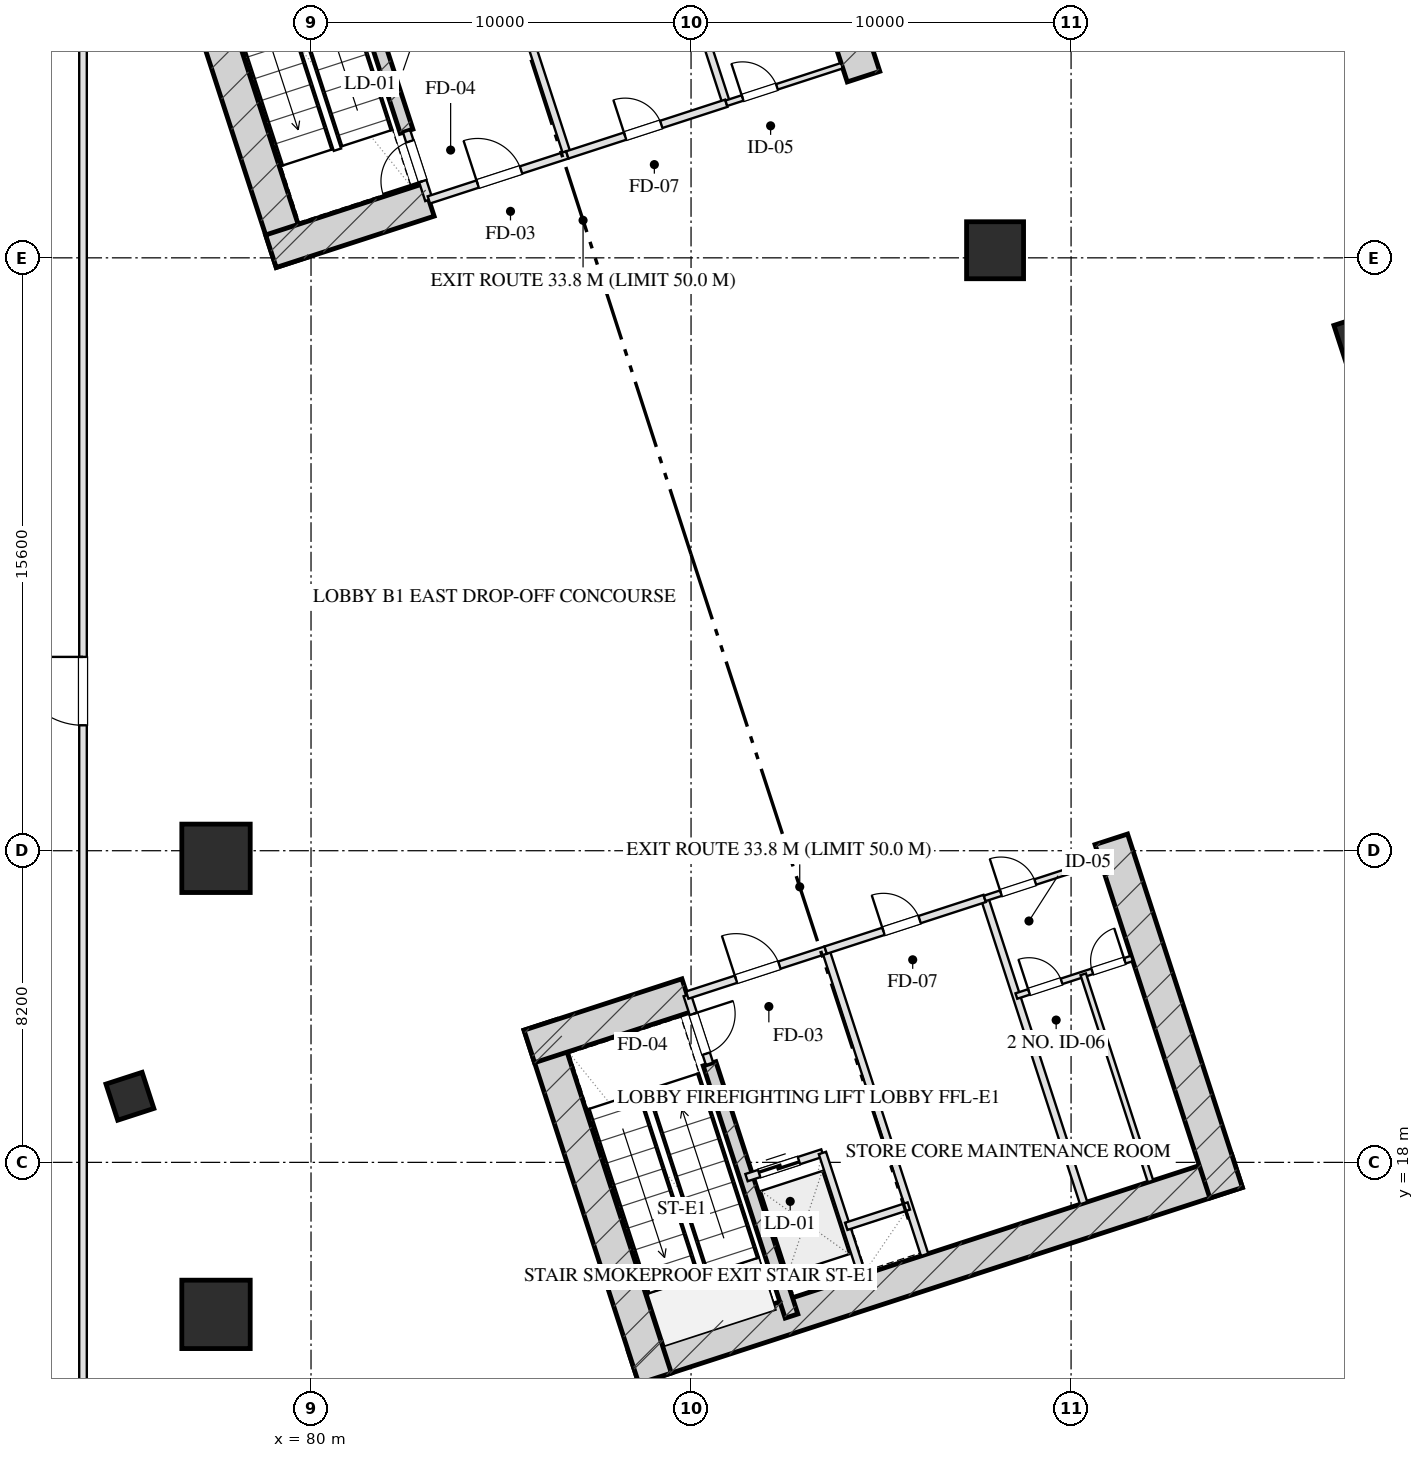
"""IFC4 building model, lengths in metres.
Left out: names, types, materials, properties, quantities, classifications, styles, units other than length and angle.
Written with IfcOpenShell. Run it as: python <this file> out.ifc"""

import sys

from ifc_helpers import new_model, si_unit, direction, frame, frame_2d, origin, origin_2d, place, context, subcontext, project, spatial, rectangle, hollow_rectangle, extrude, element, fill, save


model = new_model("IFC4")
c1 = context("Model", 3, precision=1e-05, world=origin(), true_north=direction((0.0, 1.0)))
c2 = subcontext(c1, "Body", "Model", "MODEL_VIEW")
j1 = project(units=[si_unit("LENGTHUNIT", "METRE"), si_unit("PLANEANGLEUNIT", "RADIAN")], contexts=[c1])
p1 = place(None, origin())
s1 = spatial("IfcSite", under=j1, at=p1, CompositionType="ELEMENT")
p2 = place(p1, origin())
s2 = spatial("IfcBuilding", under=s1, at=p2, CompositionType="ELEMENT")
p3 = place(p2, frame((0.0, 0.0, -6.0)))
s3 = spatial("IfcBuildingStorey", under=s2, at=p3, CompositionType="ELEMENT", Elevation=-6.0)
p4 = place(p3, frame((88.487, 12.605, 0.0), z_axis=(0.0, 0.0, 1.0), x_axis=(0.951055016115, 0.309021611416, 0.0)))
e1 = element("IfcWall", 1, at=p4, inside=s3, PredefinedType="SHEAR", context=c2, shape_type="SweptSolid", body=[
    extrude(rectangle(XDim=16.7, YDim=0.9, at=frame_2d((8.35, 0.0))), origin(), (0.0, 0.0, 1.0), 6.0),
])
p5 = place(p3, frame((86.032, 21.618, 0.0), z_axis=(0.0, 0.0, 1.0), x_axis=(0.30901438634, -0.951057363693, 0.0)))
e2 = element("IfcWall", 2, at=p5, inside=s3, PredefinedType="SHEAR", context=c2, shape_type="SweptSolid", body=[
    extrude(rectangle(XDim=9.78, YDim=0.9, at=frame_2d((4.89, 0.0))), origin(), (0.0, 0.0, 1.0), 6.0),
])
p6 = place(p3, frame((101.059, 26.5, 0.0), z_axis=(0.0, 0.0, 1.0), x_axis=(0.309021722829, -0.951054979914, 0.0)))
e3 = element("IfcWall", 3, at=p6, inside=s3, PredefinedType="SHEAR", context=c2, shape_type="SweptSolid", body=[
    extrude(rectangle(XDim=9.78, YDim=0.9, at=frame_2d((4.89, 0.0))), origin(), (0.0, 0.0, 1.0), 6.0),
])
p7 = place(p3, frame((90.486, 20.594, 0.0), z_axis=(0.0, 0.0, 1.0), x_axis=(0.309020428229, -0.951055400562, 0.0)))
e4 = element("IfcWall", 4, at=p7, inside=s3, PredefinedType="SHEAR", context=c2, shape_type="SweptSolid", body=[
    extrude(rectangle(XDim=6.98, YDim=0.35, at=frame_2d((3.49, 0.0))), origin(), (0.0, 0.0, 1.0), 6.0),
])
p8 = place(p3, frame((85.743, 21.051, 0.0), z_axis=(0.0, 0.0, 1.0), x_axis=(0.951063623806, 0.308995118848, 0.0)))
e5 = element("IfcWall", 5, at=p8, inside=s3, PredefinedType="SHEAR", context=c2, shape_type="SweptSolid", body=[
    extrude(rectangle(XDim=4.37, YDim=0.9, at=frame_2d((2.185, 0.0))), origin(), (0.0, 0.0, 1.0), 6.0),
])
for number, where, z_axis, x_axis in (
    (6, (79.512, 41.685, 0.0), (0.0, 0.0, 1.0), (-0.309, 0.951, 0.0)),
    (7, (94.539, 46.568, 0.0), (0.0, 0.0, 1.0), (-0.309, 0.951, 0.0)),
):
    element("IfcWall", number, at=place(p3, frame(where, z_axis=z_axis, x_axis=x_axis)), inside=s3, PredefinedType="SHEAR", context=c2, shape_type="SweptSolid", body=[
        extrude(rectangle(XDim=9.78, YDim=0.9, at=frame_2d((4.89, 0.0))), origin(), (0.0, 0.0, 1.0), 6.0),
    ])
p9 = place(p3, frame((82.514, 45.131, 0.0), z_axis=(0.0, 0.0, 1.0), x_axis=(-0.308988790936, 0.951065679686, 0.0)))
e8 = element("IfcWall", 8, at=p9, inside=s3, PredefinedType="SHEAR", context=c2, shape_type="SweptSolid", body=[
    extrude(rectangle(XDim=6.98, YDim=0.35, at=frame_2d((3.49, 0.0))), origin(), (0.0, 0.0, 1.0), 6.0),
])
p10 = place(p3, frame((78.945, 41.974, 0.0), z_axis=(0.0, 0.0, 1.0), x_axis=(0.951058289404, 0.309011537255, 0.0)))
e9 = element("IfcWall", 9, at=p10, inside=s3, PredefinedType="SHEAR", context=c2, shape_type="SweptSolid", body=[
    extrude(rectangle(XDim=4.37, YDim=0.9, at=frame_2d((2.185, 0.0))), origin(), (0.0, 0.0, 1.0), 6.0),
])
for number, where, z_axis, x_axis in (
    (10, (77.5, 14.0, 0.0), (0.0, 0.0, 1.0), (1.0, 0.0, 0.0)),
    (11, (77.5, 26.0, 0.0), (0.0, 0.0, 1.0), (1.0, 0.0, 0.0)),
):
    element("IfcColumn", number, at=place(p3, frame(where, z_axis=z_axis, x_axis=x_axis)), inside=s3, PredefinedType="COLUMN", context=c2, shape_type="SweptSolid", body=[
        extrude(hollow_rectangle(XDim=1.8, YDim=1.8, WallThickness=0.06, at=origin_2d()), origin(), (0.0, 0.0, 1.0), 6.001),
    ])
p11 = place(p3, frame((98.0, 42.0, 0.0), z_axis=(0.0, 0.0, 1.0), x_axis=(1.0, 0.0, 0.0)))
e12 = element("IfcColumn", 12, at=p11, inside=s3, PredefinedType="COLUMN", context=c2, shape_type="SweptSolid", body=[
    extrude(rectangle(XDim=1.5, YDim=1.5, at=origin_2d()), origin(), (0.0, 0.0, 1.0), 6.001),
])
for number, where, z_axis, x_axis in (
    (13, (75.234, 19.739, 0.0), (0.0, 0.0, 1.0), (0.951, 0.309, 0.0)),
    (14, (107.547, 39.701, 0.0), (0.0, 0.0, 1.0), (0.951, 0.309, 0.0)),
):
    element("IfcColumn", number, at=place(p3, frame(where, z_axis=z_axis, x_axis=x_axis)), inside=s3, PredefinedType="COLUMN", context=c2, shape_type="SweptSolid", body=[
        extrude(hollow_rectangle(XDim=1.0, YDim=1.0, WallThickness=0.036, at=origin_2d()), origin(), (0.0, 0.0, 1.0), 6.001),
    ])
p12 = place(p3, frame((89.899, 22.401, 0.0), z_axis=(0.0, 0.0, 1.0), x_axis=(0.308932062672, -0.951084108086, 0.0)))
e15 = element("IfcWall", 15, at=p12, inside=s3, PredefinedType="PARTITIONING", context=c2, shape_type="SweptSolid", body=[
    extrude(rectangle(XDim=1.9, YDim=0.2, at=frame_2d((0.95, 0.0))), origin(), (0.0, 0.0, 1.0), 5.685),
])
p13 = place(p12, frame((0.52, 0.0, 0.0)))
e16 = element("IfcOpeningElement", 16, at=p13, cuts=e15, PredefinedType="OPENING", context=c2, shape_type="SweptSolid", body=[
    extrude(rectangle(XDim=1.1, YDim=2.05, at=frame_2d((0.55, 1.025))), frame((0.0, 0.11, 0.0), z_axis=(0.0, -1.0, 0.0), x_axis=(1.0, 0.0, 0.0)), (0.0, 0.0, 1.0), 0.22),
])
p14 = place(p3, frame((93.542, 23.585, 0.0), z_axis=(0.0, 0.0, 1.0), x_axis=(0.309042196757, -0.951048327176, 0.0)))
e17 = element("IfcWall", 17, at=p14, inside=s3, PredefinedType="PARTITIONING", context=c2, shape_type="SweptSolid", body=[
    extrude(rectangle(XDim=8.43, YDim=0.2, at=frame_2d((4.215, 0.0))), origin(), (0.0, 0.0, 1.0), 5.685),
])
p15 = place(p3, frame((89.899, 22.401, 0.0), z_axis=(0.0, 0.0, 1.0), x_axis=(0.951046716504, 0.309047153403, 0.0)))
e18 = element("IfcWall", 18, at=p15, inside=s3, PredefinedType="PARTITIONING", context=c2, shape_type="SweptSolid", body=[
    extrude(rectangle(XDim=3.83, YDim=0.2, at=frame_2d((1.915, 0.0))), origin(), (0.0, 0.0, 1.0), 5.685),
])
p16 = place(p15, frame((1.35, 0.0, 0.0)))
e19 = element("IfcOpeningElement", 19, at=p16, cuts=e18, PredefinedType="OPENING", context=c2, shape_type="SweptSolid", body=[
    extrude(rectangle(XDim=1.2, YDim=2.05, at=frame_2d((0.6, 1.025))), frame((0.0, 0.11, 0.0), z_axis=(0.0, -1.0, 0.0), x_axis=(1.0, 0.0, 0.0)), (0.0, 0.0, 1.0), 0.22),
])
p17 = place(p3, frame((91.46, 17.598, 0.0), z_axis=(0.0, 0.0, 1.0), x_axis=(0.951062257173, 0.308999325213, 0.0)))
e20 = element("IfcWall", 20, at=p17, inside=s3, PredefinedType="PARTITIONING", context=c2, shape_type="SweptSolid", body=[
    extrude(rectangle(XDim=2.1, YDim=0.2, at=frame_2d((1.05, 0.0))), origin(), (0.0, 0.0, 1.0), 5.685),
])
p18 = place(p17, frame((0.35, 0.0, 0.0)))
e21 = element("IfcOpeningElement", 21, at=p18, cuts=e20, PredefinedType="OPENING", context=c2, shape_type="SweptSolid", body=[
    extrude(rectangle(XDim=1.1, YDim=2.05, at=frame_2d((0.55, 1.025))), frame((0.0, 0.11, 0.0), z_axis=(0.0, -1.0, 0.0), x_axis=(1.0, 0.0, 0.0)), (0.0, 0.0, 1.0), 0.22),
])
p19 = place(p3, frame((93.457, 18.247, 0.0), z_axis=(0.0, 0.0, 1.0), x_axis=(0.3089935693, -0.951064127245, 0.0)))
e22 = element("IfcWall", 22, at=p19, inside=s3, PredefinedType="PARTITIONING", context=c2, shape_type="SweptSolid", body=[
    extrude(rectangle(XDim=3.7, YDim=0.2, at=frame_2d((1.85, 0.0))), origin(), (0.0, 0.0, 1.0), 5.685),
])
p20 = place(p3, frame((94.084, 16.317, 0.0), z_axis=(0.0, 0.0, 1.0), x_axis=(0.951041328149, 0.309063734775, 0.0)))
e23 = element("IfcWall", 23, at=p20, inside=s3, PredefinedType="PARTITIONING", context=c2, shape_type="SweptSolid", body=[
    extrude(rectangle(XDim=1.73, YDim=0.2, at=frame_2d((0.865, 0.0))), origin(), (0.0, 0.0, 1.0), 5.685),
])
p21 = place(p3, frame((97.727, 24.944, 0.0), z_axis=(0.0, 0.0, 1.0), x_axis=(0.309016001439, -0.951056838919, 0.0)))
e24 = element("IfcWall", 24, at=p21, inside=s3, PredefinedType="PARTITIONING", context=c2, shape_type="SweptSolid", body=[
    extrude(rectangle(XDim=8.43, YDim=0.2, at=frame_2d((4.215, 0.0))), origin(), (0.0, 0.0, 1.0), 5.685),
])
p22 = place(p3, frame((93.542, 23.585, 0.0), z_axis=(0.0, 0.0, 1.0), x_axis=(0.951063829732, 0.308994485023, 0.0)))
e25 = element("IfcWall", 25, at=p22, inside=s3, PredefinedType="PARTITIONING", context=c2, shape_type="SweptSolid", body=[
    extrude(rectangle(XDim=4.4, YDim=0.2, at=frame_2d((2.2, 0.0))), origin(), (0.0, 0.0, 1.0), 5.685),
])
p23 = place(p22, frame((1.6, 0.0, 0.0)))
e26 = element("IfcOpeningElement", 26, at=p23, cuts=e25, PredefinedType="OPENING", context=c2, shape_type="SweptSolid", body=[
    extrude(rectangle(XDim=1.0, YDim=2.05, at=frame_2d((0.5, 1.025))), frame((0.0, 0.11, 0.0), z_axis=(0.0, -1.0, 0.0), x_axis=(1.0, 0.0, 0.0)), (0.0, 0.0, 1.0), 0.22),
])
p24 = place(p3, frame((97.727, 24.944, 0.0), z_axis=(0.0, 0.0, 1.0), x_axis=(0.951036872128, 0.309077446369, 0.0)))
e27 = element("IfcWall", 27, at=p24, inside=s3, PredefinedType="PARTITIONING", context=c2, shape_type="SweptSolid", body=[
    extrude(rectangle(XDim=3.2, YDim=0.15, at=frame_2d((1.6, 0.0))), origin(), (0.0, 0.0, 1.0), 5.685),
])
p25 = place(p24, frame((0.45, 0.0, 0.0)))
e28 = element("IfcOpeningElement", 28, at=p25, cuts=e27, PredefinedType="OPENING", context=c2, shape_type="SweptSolid", body=[
    extrude(rectangle(XDim=0.95, YDim=2.05, at=frame_2d((0.475, 1.025))), frame((0.0, 0.085, 0.0), z_axis=(0.0, -1.0, 0.0), x_axis=(1.0, 0.0, 0.0)), (0.0, 0.0, 1.0), 0.17),
])
p26 = place(p3, frame((98.561, 22.376, 0.0), z_axis=(0.0, 0.0, 1.0), x_axis=(0.95104415986, 0.309055020985, 0.0)))
e29 = element("IfcWall", 29, at=p26, inside=s3, PredefinedType="PARTITIONING", context=c2, shape_type="SweptSolid", body=[
    extrude(rectangle(XDim=3.2, YDim=0.15, at=frame_2d((1.6, 0.0))), origin(), (0.0, 0.0, 1.0), 5.685),
])
p27 = place(p26, frame((0.35, 0.0, 0.0)))
e30 = element("IfcOpeningElement", 30, at=p27, cuts=e29, PredefinedType="OPENING", context=c2, shape_type="SweptSolid", body=[
    extrude(rectangle(XDim=0.9, YDim=2.05, at=frame_2d((0.45, 1.025))), frame((0.0, 0.085, 0.0), z_axis=(0.0, -1.0, 0.0), x_axis=(1.0, 0.0, 0.0)), (0.0, 0.0, 1.0), 0.17),
])
p28 = place(p26, frame((2.1, 0.0, 0.0)))
e31 = element("IfcOpeningElement", 31, at=p28, cuts=e29, PredefinedType="OPENING", context=c2, shape_type="SweptSolid", body=[
    extrude(rectangle(XDim=0.9, YDim=2.05, at=frame_2d((0.45, 1.025))), frame((0.0, 0.085, 0.0), z_axis=(0.0, -1.0, 0.0), x_axis=(1.0, 0.0, 0.0)), (0.0, 0.0, 1.0), 0.17),
])
p29 = place(p3, frame((100.32, 22.948, 0.0), z_axis=(0.0, 0.0, 1.0), x_axis=(0.309035009867, -0.951050662518, 0.0)))
e32 = element("IfcWall", 32, at=p29, inside=s3, PredefinedType="PARTITIONING", context=c2, shape_type="SweptSolid", body=[
    extrude(rectangle(XDim=5.73, YDim=0.15, at=frame_2d((2.865, 0.0))), origin(), (0.0, 0.0, 1.0), 5.685),
])
p30 = place(p3, frame((83.101, 43.324, 0.0), z_axis=(0.0, 0.0, 1.0), x_axis=(-0.309048298632, 0.951046344356, 0.0)))
e33 = element("IfcWall", 33, at=p30, inside=s3, PredefinedType="PARTITIONING", context=c2, shape_type="SweptSolid", body=[
    extrude(rectangle(XDim=1.9, YDim=0.2, at=frame_2d((0.95, 0.0))), origin(), (0.0, 0.0, 1.0), 5.685),
])
p31 = place(p30, frame((0.52, 0.0, 0.0)))
e34 = element("IfcOpeningElement", 34, at=p31, cuts=e33, PredefinedType="OPENING", context=c2, shape_type="SweptSolid", body=[
    extrude(rectangle(XDim=1.1, YDim=2.05, at=frame_2d((0.55, 1.025))), frame((0.0, 0.11, 0.0), z_axis=(0.0, -1.0, 0.0), x_axis=(1.0, 0.0, 0.0)), (0.0, 0.0, 1.0), 0.22),
])
p32 = place(p3, frame((86.743, 44.508, 0.0), z_axis=(0.0, 0.0, 1.0), x_axis=(-0.309016001439, 0.951056838919, 0.0)))
e35 = element("IfcWall", 35, at=p32, inside=s3, PredefinedType="PARTITIONING", context=c2, shape_type="SweptSolid", body=[
    extrude(rectangle(XDim=8.43, YDim=0.2, at=frame_2d((4.215, 0.0))), origin(), (0.0, 0.0, 1.0), 5.685),
])
p33 = place(p3, frame((83.101, 43.324, 0.0), z_axis=(0.0, 0.0, 1.0), x_axis=(0.951052804469, 0.309028417967, 0.0)))
e36 = element("IfcWall", 36, at=p33, inside=s3, PredefinedType="PARTITIONING", context=c2, shape_type="SweptSolid", body=[
    extrude(rectangle(XDim=3.83, YDim=0.2, at=frame_2d((1.915, 0.0))), origin(), (0.0, 0.0, 1.0), 5.685),
])
p34 = place(p33, frame((1.35, 0.0, 0.0)))
e37 = element("IfcOpeningElement", 37, at=p34, cuts=e36, PredefinedType="OPENING", context=c2, shape_type="SweptSolid", body=[
    extrude(rectangle(XDim=1.2, YDim=2.05, at=frame_2d((0.6, 1.025))), frame((0.0, 0.11, 0.0), z_axis=(0.0, -1.0, 0.0), x_axis=(1.0, 0.0, 0.0)), (0.0, 0.0, 1.0), 0.22),
])
p35 = place(p3, frame((90.928, 45.868, 0.0), z_axis=(0.0, 0.0, 1.0), x_axis=(-0.309042196757, 0.951048327176, 0.0)))
e38 = element("IfcWall", 38, at=p35, inside=s3, PredefinedType="PARTITIONING", context=c2, shape_type="SweptSolid", body=[
    extrude(rectangle(XDim=8.43, YDim=0.2, at=frame_2d((4.215, 0.0))), origin(), (0.0, 0.0, 1.0), 5.685),
])
p36 = place(p3, frame((86.743, 44.508, 0.0), z_axis=(0.0, 0.0, 1.0), x_axis=(0.951063829732, 0.308994485023, 0.0)))
e39 = element("IfcWall", 39, at=p36, inside=s3, PredefinedType="PARTITIONING", context=c2, shape_type="SweptSolid", body=[
    extrude(rectangle(XDim=4.4, YDim=0.2, at=frame_2d((2.2, 0.0))), origin(), (0.0, 0.0, 1.0), 5.685),
])
p37 = place(p36, frame((1.6, 0.0, 0.0)))
e40 = element("IfcOpeningElement", 40, at=p37, cuts=e39, PredefinedType="OPENING", context=c2, shape_type="SweptSolid", body=[
    extrude(rectangle(XDim=1.0, YDim=2.05, at=frame_2d((0.5, 1.025))), frame((0.0, 0.11, 0.0), z_axis=(0.0, -1.0, 0.0), x_axis=(1.0, 0.0, 0.0)), (0.0, 0.0, 1.0), 0.22),
])
p38 = place(p3, frame((90.928, 45.868, 0.0), z_axis=(0.0, 0.0, 1.0), x_axis=(0.951059297078, 0.309008435874, 0.0)))
e41 = element("IfcWall", 41, at=p38, inside=s3, PredefinedType="PARTITIONING", context=c2, shape_type="SweptSolid", body=[
    extrude(rectangle(XDim=3.2, YDim=0.15, at=frame_2d((1.6, 0.0))), origin(), (0.0, 0.0, 1.0), 5.685),
])
p39 = place(p38, frame((0.45, 0.0, 0.0)))
e42 = element("IfcOpeningElement", 42, at=p39, cuts=e41, PredefinedType="OPENING", context=c2, shape_type="SweptSolid", body=[
    extrude(rectangle(XDim=0.95, YDim=2.05, at=frame_2d((0.475, 1.025))), frame((0.0, 0.085, 0.0), z_axis=(0.0, -1.0, 0.0), x_axis=(1.0, 0.0, 0.0)), (0.0, 0.0, 1.0), 0.17),
])
p40 = place(p3, frame((74.0, 11.5, 0.0), z_axis=(0.0, 0.0, 1.0), x_axis=(0.0, 1.0, 0.0)))
e43 = element("IfcWall", 43, at=p40, inside=s3, PredefinedType="PARTITIONING", context=c2, shape_type="SweptSolid", body=[
    extrude(rectangle(XDim=45.0, YDim=0.2, at=frame_2d((22.5, 0.0))), origin(), (0.0, 0.0, 1.0), 5.685),
])
p41 = place(p40, frame((18.0, 0.0, 0.0)))
e44 = element("IfcOpeningElement", 44, at=p41, cuts=e43, PredefinedType="OPENING", context=c2, shape_type="SweptSolid", body=[
    extrude(rectangle(XDim=1.8, YDim=2.05, at=frame_2d((0.9, 1.025))), frame((0.0, 0.11, 0.0), z_axis=(0.0, -1.0, 0.0), x_axis=(1.0, 0.0, 0.0)), (0.0, 0.0, 1.0), 0.22),
])
p42 = place(p13, origin())
e45 = element("IfcDoor", 45, at=p42, inside=s3, OperationType="SINGLE_SWING_LEFT", PredefinedType="DOOR", context=c2, shape_type="SweptSolid", body=[
    extrude(rectangle(XDim=1.1, YDim=2.05, at=frame_2d((0.55, 1.025))), frame((0.0, 0.025, 0.0), z_axis=(0.0, -1.0, 0.0), x_axis=(1.0, 0.0, 0.0)), (0.0, 0.0, 1.0), 0.05),
])
fill(e16, e45)
p43 = place(p16, origin())
e46 = element("IfcDoor", 46, at=p43, inside=s3, OperationType="SINGLE_SWING_LEFT", PredefinedType="DOOR", context=c2, shape_type="SweptSolid", body=[
    extrude(rectangle(XDim=1.2, YDim=2.05, at=frame_2d((0.6, 1.025))), frame((0.0, 0.025, 0.0), z_axis=(0.0, -1.0, 0.0), x_axis=(1.0, 0.0, 0.0)), (0.0, 0.0, 1.0), 0.05),
])
fill(e19, e46)
p44 = place(p18, origin())
e47 = element("IfcDoor", 47, at=p44, inside=s3, OperationType="DOUBLE_DOOR_SLIDING", PredefinedType="DOOR", context=c2, shape_type="SweptSolid", body=[
    extrude(rectangle(XDim=1.1, YDim=2.05, at=frame_2d((0.55, 1.025))), frame((0.0, 0.025, 0.0), z_axis=(0.0, -1.0, 0.0), x_axis=(1.0, 0.0, 0.0)), (0.0, 0.0, 1.0), 0.05),
])
fill(e21, e47)
p45 = place(p23, origin())
e48 = element("IfcDoor", 48, at=p45, inside=s3, OperationType="SINGLE_SWING_LEFT", PredefinedType="DOOR", context=c2, shape_type="SweptSolid", body=[
    extrude(rectangle(XDim=1.0, YDim=2.05, at=frame_2d((0.5, 1.025))), frame((0.0, 0.025, 0.0), z_axis=(0.0, -1.0, 0.0), x_axis=(1.0, 0.0, 0.0)), (0.0, 0.0, 1.0), 0.05),
])
fill(e26, e48)
p46 = place(p25, origin())
e49 = element("IfcDoor", 49, at=p46, inside=s3, OperationType="SINGLE_SWING_LEFT", PredefinedType="DOOR", context=c2, shape_type="SweptSolid", body=[
    extrude(rectangle(XDim=0.95, YDim=2.05, at=frame_2d((0.475, 1.025))), frame((0.0, 0.025, 0.0), z_axis=(0.0, -1.0, 0.0), x_axis=(1.0, 0.0, 0.0)), (0.0, 0.0, 1.0), 0.05),
])
fill(e28, e49)
p47 = place(p27, origin())
e50 = element("IfcDoor", 50, at=p47, inside=s3, OperationType="SINGLE_SWING_LEFT", PredefinedType="DOOR", context=c2, shape_type="SweptSolid", body=[
    extrude(rectangle(XDim=0.9, YDim=2.05, at=frame_2d((0.45, 1.025))), frame((0.0, 0.025, 0.0), z_axis=(0.0, -1.0, 0.0), x_axis=(1.0, 0.0, 0.0)), (0.0, 0.0, 1.0), 0.05),
])
fill(e30, e50)
p48 = place(p28, origin())
e51 = element("IfcDoor", 51, at=p48, inside=s3, OperationType="SINGLE_SWING_RIGHT", PredefinedType="DOOR", context=c2, shape_type="SweptSolid", body=[
    extrude(rectangle(XDim=0.9, YDim=2.05, at=frame_2d((0.45, 1.025))), frame((0.0, 0.025, 0.0), z_axis=(0.0, -1.0, 0.0), x_axis=(1.0, 0.0, 0.0)), (0.0, 0.0, 1.0), 0.05),
])
fill(e31, e51)
p49 = place(p31, origin())
e52 = element("IfcDoor", 52, at=p49, inside=s3, OperationType="SINGLE_SWING_LEFT", PredefinedType="DOOR", context=c2, shape_type="SweptSolid", body=[
    extrude(rectangle(XDim=1.1, YDim=2.05, at=frame_2d((0.55, 1.025))), frame((0.0, 0.025, 0.0), z_axis=(0.0, -1.0, 0.0), x_axis=(1.0, 0.0, 0.0)), (0.0, 0.0, 1.0), 0.05),
])
fill(e34, e52)
p50 = place(p34, origin())
e53 = element("IfcDoor", 53, at=p50, inside=s3, OperationType="SINGLE_SWING_LEFT", PredefinedType="DOOR", context=c2, shape_type="SweptSolid", body=[
    extrude(rectangle(XDim=1.2, YDim=2.05, at=frame_2d((0.6, 1.025))), frame((0.0, 0.025, 0.0), z_axis=(0.0, -1.0, 0.0), x_axis=(1.0, 0.0, 0.0)), (0.0, 0.0, 1.0), 0.05),
])
fill(e37, e53)
p51 = place(p37, origin())
e54 = element("IfcDoor", 54, at=p51, inside=s3, OperationType="SINGLE_SWING_LEFT", PredefinedType="DOOR", context=c2, shape_type="SweptSolid", body=[
    extrude(rectangle(XDim=1.0, YDim=2.05, at=frame_2d((0.5, 1.025))), frame((0.0, 0.025, 0.0), z_axis=(0.0, -1.0, 0.0), x_axis=(1.0, 0.0, 0.0)), (0.0, 0.0, 1.0), 0.05),
])
fill(e40, e54)
p52 = place(p39, origin())
e55 = element("IfcDoor", 55, at=p52, inside=s3, OperationType="SINGLE_SWING_LEFT", PredefinedType="DOOR", context=c2, shape_type="SweptSolid", body=[
    extrude(rectangle(XDim=0.95, YDim=2.05, at=frame_2d((0.475, 1.025))), frame((0.0, 0.025, 0.0), z_axis=(0.0, -1.0, 0.0), x_axis=(1.0, 0.0, 0.0)), (0.0, 0.0, 1.0), 0.05),
])
fill(e42, e55)
p53 = place(p41, origin())
e56 = element("IfcDoor", 56, at=p53, inside=s3, OperationType="SINGLE_SWING_RIGHT", PredefinedType="DOOR", context=c2, shape_type="SweptSolid", body=[
    extrude(rectangle(XDim=1.8, YDim=2.05, at=frame_2d((0.9, 1.025))), frame((0.0, 0.025, 0.0), z_axis=(0.0, -1.0, 0.0), x_axis=(1.0, 0.0, 0.0)), (0.0, 0.0, 1.0), 0.05),
])
fill(e44, e56)
save(model, sys.argv[1])
